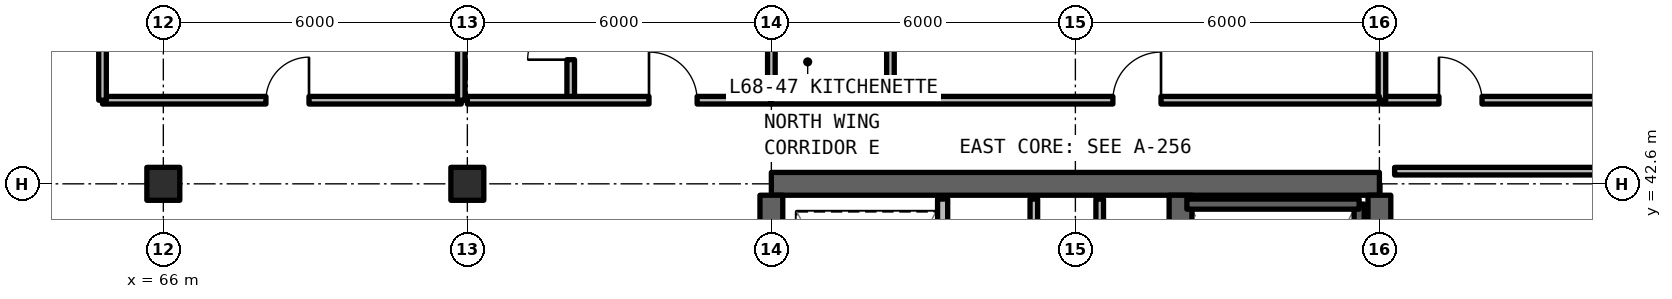
"""IFC4 building model, lengths in metres.
Left out: names, types, materials, properties, quantities, classifications, styles, units other than length and angle.
Written with IfcOpenShell. Run it as: python <this file> out.ifc"""

import sys

from ifc_helpers import new_model, si_unit, direction, frame, frame_2d, origin, origin_2d, place, context, subcontext, project, spatial, rectangle, extrude, element, fill, save


model = new_model("IFC4")
c1 = context("Model", 3, precision=1e-05, world=origin(), true_north=direction((0.0, 1.0)))
c2 = subcontext(c1, "Body", "Model", "MODEL_VIEW")
j1 = project(units=[si_unit("LENGTHUNIT", "METRE"), si_unit("PLANEANGLEUNIT", "RADIAN")], contexts=[c1])
p1 = place(None, origin())
s1 = spatial("IfcSite", under=j1, at=p1, CompositionType="ELEMENT")
p2 = place(p1, origin())
s2 = spatial("IfcBuilding", under=s1, at=p2, CompositionType="ELEMENT")
p3 = place(p2, frame((0.0, 0.0, 242.55)))
s3 = spatial("IfcBuildingStorey", under=s2, at=p3, CompositionType="ELEMENT", Elevation=242.55)
p4 = place(p3, frame((90.0, 42.6, 0.0), z_axis=(0.0, 0.0, 1.0), x_axis=(-1.0, 0.0, 0.0)))
e1 = element("IfcWall", 1, at=p4, inside=s3, PredefinedType="SHEAR", context=c2, shape_type="SweptSolid", body=[
    extrude(rectangle(XDim=12.0, YDim=0.45, at=frame_2d((6.0, 0.0))), origin(), (0.0, 0.0, 1.0), 3.63),
])
p5 = place(p3, frame((90.0, 24.825, 0.0), z_axis=(0.0, 0.0, 1.0), x_axis=(0.0, 1.0, 0.0)))
e2 = element("IfcWall", 2, at=p5, inside=s3, PredefinedType="SHEAR", context=c2, shape_type="SweptSolid", body=[
    extrude(rectangle(XDim=17.55, YDim=0.45, at=frame_2d((8.775, 0.0))), origin(), (0.0, 0.0, 1.0), 3.63),
])
p6 = place(p3, frame((78.0, 36.8, 0.0), z_axis=(0.0, 0.0, 1.0), x_axis=(0.0, 1.0, 0.0)))
e3 = element("IfcWall", 3, at=p6, inside=s3, PredefinedType="SHEAR", context=c2, shape_type="SweptSolid", body=[
    extrude(rectangle(XDim=5.575, YDim=0.45, at=frame_2d((2.788, 0.0))), origin(), (0.0, 0.0, 1.0), 3.63),
])
p7 = place(p3, frame((86.075, 24.825, 0.0), z_axis=(0.0, 0.0, 1.0), x_axis=(0.0, 1.0, 0.0)))
e4 = element("IfcWall", 4, at=p7, inside=s3, PredefinedType="SHEAR", context=c2, shape_type="SweptSolid", body=[
    extrude(rectangle(XDim=17.55, YDim=0.45, at=frame_2d((8.775, 0.0))), origin(), (0.0, 0.0, 1.0), 3.63),
])
p8 = place(p7, frame((0.425, 0.0, 0.0)))
e5 = element("IfcOpeningElement", 5, at=p8, cuts=e4, PredefinedType="OPENING", context=c2, shape_type="SweptSolid", body=[
    extrude(rectangle(XDim=1.15, YDim=2.15, at=frame_2d((0.575, 1.075))), frame((0.0, 0.235, 0.0), z_axis=(0.0, -1.0, 0.0), x_axis=(1.0, 0.0, 0.0)), (0.0, 0.0, 1.0), 0.47),
])
p9 = place(p7, frame((9.625, 0.0, 0.0)))
e6 = element("IfcOpeningElement", 6, at=p9, cuts=e4, PredefinedType="OPENING", context=c2, shape_type="SweptSolid", body=[
    extrude(rectangle(XDim=1.15, YDim=2.15, at=frame_2d((0.575, 1.075))), frame((0.0, 0.235, 0.0), z_axis=(0.0, -1.0, 0.0), x_axis=(1.0, 0.0, 0.0)), (0.0, 0.0, 1.0), 0.47),
])
for number, where, z_axis, x_axis in (
    (7, (66.0, 42.6, 0.0), (0.0, 0.0, 1.0), (1.0, 0.0, 0.0)),
    (8, (72.0, 42.6, 0.0), (0.0, 0.0, 1.0), (1.0, 0.0, 0.0)),
):
    element("IfcColumn", number, at=place(p3, frame(where, z_axis=z_axis, x_axis=x_axis)), inside=s3, PredefinedType="COLUMN", context=c2, shape_type="SweptSolid", body=[
        extrude(rectangle(XDim=0.65, YDim=0.65, at=origin_2d()), origin(), (0.0, 0.0, 1.0), 3.63),
    ])
p10 = place(p3, frame((84.48, 36.88, 0.0), z_axis=(0.0, 0.0, 1.0), x_axis=(0.0, 1.0, 0.0)))
e9 = element("IfcWall", 9, at=p10, inside=s3, PredefinedType="SOLIDWALL", context=c2, shape_type="SweptSolid", body=[
    extrude(rectangle(XDim=5.42, YDim=0.15, at=frame_2d((2.71, 0.0))), origin(), (0.0, 0.0, 1.0), 2.63),
])
p11 = place(p3, frame((83.18, 36.88, 0.0), z_axis=(0.0, 0.0, 1.0), x_axis=(0.0, 1.0, 0.0)))
e10 = element("IfcWall", 10, at=p11, inside=s3, PredefinedType="SOLIDWALL", context=c2, shape_type="SweptSolid", body=[
    extrude(rectangle(XDim=5.42, YDim=0.15, at=frame_2d((2.71, 0.0))), origin(), (0.0, 0.0, 1.0), 2.63),
])
p12 = place(p11, frame((2.1, 0.0, 0.0)))
e11 = element("IfcOpeningElement", 11, at=p12, cuts=e10, PredefinedType="OPENING", context=c2, shape_type="SweptSolid", body=[
    extrude(rectangle(XDim=0.95, YDim=2.15, at=frame_2d((0.475, 1.075))), frame((0.0, 0.085, 0.0), z_axis=(0.0, -1.0, 0.0), x_axis=(1.0, 0.0, 0.0)), (0.0, 0.0, 1.0), 0.17),
])
p13 = place(p3, frame((81.38, 36.88, 0.0), z_axis=(0.0, 0.0, 1.0), x_axis=(0.0, 1.0, 0.0)))
e12 = element("IfcWall", 12, at=p13, inside=s3, PredefinedType="SOLIDWALL", context=c2, shape_type="SweptSolid", body=[
    extrude(rectangle(XDim=5.42, YDim=0.2, at=frame_2d((2.71, 0.0))), origin(), (0.0, 0.0, 1.0), 2.63),
])
p14 = place(p13, frame((0.8, 0.0, 0.0)))
e13 = element("IfcOpeningElement", 13, at=p14, cuts=e12, PredefinedType="OPENING", context=c2, shape_type="SweptSolid", body=[
    extrude(rectangle(XDim=1.1, YDim=2.2, at=frame_2d((0.55, 1.1))), frame((0.0, 0.11, 0.0), z_axis=(0.0, -1.0, 0.0), x_axis=(1.0, 0.0, 0.0)), (0.0, 0.0, 1.0), 0.22),
])
p15 = place(p13, frame((3.3, 0.0, 0.0)))
e14 = element("IfcOpeningElement", 14, at=p15, cuts=e12, PredefinedType="OPENING", context=c2, shape_type="SweptSolid", body=[
    extrude(rectangle(XDim=1.1, YDim=2.2, at=frame_2d((0.55, 1.1))), frame((0.0, 0.11, 0.0), z_axis=(0.0, -1.0, 0.0), x_axis=(1.0, 0.0, 0.0)), (0.0, 0.0, 1.0), 0.22),
])
p16 = place(p3, frame((64.8, 44.25, 0.0), z_axis=(0.0, 0.0, 1.0), x_axis=(1.0, 0.0, 0.0)))
e15 = element("IfcWall", 15, at=p16, inside=s3, PredefinedType="SOLIDWALL", context=c2, shape_type="SweptSolid", body=[
    extrude(rectangle(XDim=7.08, YDim=0.15, at=frame_2d((3.54, 0.0))), origin(), (0.0, 0.0, 1.0), 2.63),
])
p17 = place(p16, frame((3.225, 0.0, 0.0)))
e16 = element("IfcOpeningElement", 16, at=p17, cuts=e15, PredefinedType="OPENING", context=c2, shape_type="SweptSolid", body=[
    extrude(rectangle(XDim=0.85, YDim=2.1, at=frame_2d((0.425, 1.05))), frame((0.0, 0.085, 0.0), z_axis=(0.0, -1.0, 0.0), x_axis=(1.0, 0.0, 0.0)), (0.0, 0.0, 1.0), 0.17),
])
p18 = place(p3, frame((64.8, 44.25, 0.0), z_axis=(0.0, 0.0, 1.0), x_axis=(0.0, 1.0, 0.0)))
e17 = element("IfcWall", 17, at=p18, inside=s3, PredefinedType="SOLIDWALL", context=c2, shape_type="SweptSolid", body=[
    extrude(rectangle(XDim=3.4, YDim=0.15, at=frame_2d((1.7, 0.0))), origin(), (0.0, 0.0, 1.0), 2.63),
])
p19 = place(p3, frame((71.88, 44.25, 0.0), z_axis=(0.0, 0.0, 1.0), x_axis=(0.0, 1.0, 0.0)))
e18 = element("IfcWall", 18, at=p19, inside=s3, PredefinedType="SOLIDWALL", context=c2, shape_type="SweptSolid", body=[
    extrude(rectangle(XDim=10.61, YDim=0.15, at=frame_2d((5.305, 0.0))), origin(), (0.0, 0.0, 1.0), 2.63),
])
p20 = place(p3, frame((90.3, 42.85, 0.0), z_axis=(0.0, 0.0, 1.0), x_axis=(1.0, 0.0, 0.0)))
e19 = element("IfcWall", 19, at=p20, inside=s3, PredefinedType="SOLIDWALL", context=c2, shape_type="SweptSolid", body=[
    extrude(rectangle(XDim=8.52, YDim=0.15, at=frame_2d((4.26, 0.0))), origin(), (0.0, 0.0, 1.0), 2.63),
])
p21 = place(p3, frame((90.05, 44.25, 0.0), z_axis=(0.0, 0.0, 1.0), x_axis=(1.0, 0.0, 0.0)))
e20 = element("IfcWall", 20, at=p21, inside=s3, PredefinedType="SOLIDWALL", context=c2, shape_type="SweptSolid", body=[
    extrude(rectangle(XDim=5.37, YDim=0.15, at=frame_2d((2.685, 0.0))), origin(), (0.0, 0.0, 1.0), 2.63),
])
p22 = place(p21, frame((1.125, 0.0, 0.0)))
e21 = element("IfcOpeningElement", 21, at=p22, cuts=e20, PredefinedType="OPENING", context=c2, shape_type="SweptSolid", body=[
    extrude(rectangle(XDim=0.85, YDim=2.1, at=frame_2d((0.425, 1.05))), frame((0.0, 0.085, 0.0), z_axis=(0.0, -1.0, 0.0), x_axis=(1.0, 0.0, 0.0)), (0.0, 0.0, 1.0), 0.17),
])
for number, where, z_axis, x_axis in (
    (22, (90.05, 44.25, 0.0), (0.0, 0.0, 1.0), (0.0, 1.0, 0.0)),
    (23, (78.0, 44.25, 0.0), (0.0, 0.0, 1.0), (0.0, 1.0, 0.0)),
):
    element("IfcWall", number, at=place(p3, frame(where, z_axis=z_axis, x_axis=x_axis)), inside=s3, PredefinedType="SOLIDWALL", context=c2, shape_type="SweptSolid", body=[
        extrude(rectangle(XDim=10.61, YDim=0.15, at=frame_2d((5.305, 0.0))), origin(), (0.0, 0.0, 1.0), 2.63),
    ])
p23 = place(p3, frame((74.04, 44.25, 0.0), z_axis=(0.0, 0.0, 1.0), x_axis=(0.0, 1.0, 0.0)))
e24 = element("IfcWall", 24, at=p23, inside=s3, PredefinedType="PARTITIONING", context=c2, shape_type="SweptSolid", body=[
    extrude(rectangle(XDim=10.61, YDim=0.15, at=frame_2d((5.305, 0.0))), origin(), (0.0, 0.0, 1.0), 2.63),
])
p24 = place(p23, frame((0.8, 0.0, 0.0)))
e25 = element("IfcOpeningElement", 25, at=p24, cuts=e24, PredefinedType="OPENING", context=c2, shape_type="SweptSolid", body=[
    extrude(rectangle(XDim=0.85, YDim=2.1, at=frame_2d((0.425, 1.05))), frame((0.0, 0.085, 0.0), z_axis=(0.0, -1.0, 0.0), x_axis=(1.0, 0.0, 0.0)), (0.0, 0.0, 1.0), 0.17),
])
p25 = place(p23, frame((5.374, 0.0, 0.0)))
e26 = element("IfcOpeningElement", 26, at=p25, cuts=e24, PredefinedType="OPENING", context=c2, shape_type="SweptSolid", body=[
    extrude(rectangle(XDim=0.85, YDim=2.1, at=frame_2d((0.425, 1.05))), frame((0.0, 0.085, 0.0), z_axis=(0.0, -1.0, 0.0), x_axis=(1.0, 0.0, 0.0)), (0.0, 0.0, 1.0), 0.17),
])
p26 = place(p3, frame((72.0, 44.25, 0.0), z_axis=(0.0, 0.0, 1.0), x_axis=(1.0, 0.0, 0.0)))
e27 = element("IfcWall", 27, at=p26, inside=s3, PredefinedType="SOLIDWALL", context=c2, shape_type="SweptSolid", body=[
    extrude(rectangle(XDim=6.0, YDim=0.15, at=frame_2d((3.0, 0.0))), origin(), (0.0, 0.0, 1.0), 2.63),
])
p27 = place(p26, frame((3.585, 0.0, 0.0)))
e28 = element("IfcOpeningElement", 28, at=p27, cuts=e27, PredefinedType="OPENING", context=c2, shape_type="SweptSolid", body=[
    extrude(rectangle(XDim=0.95, YDim=2.15, at=frame_2d((0.475, 1.075))), frame((0.0, 0.085, 0.0), z_axis=(0.0, -1.0, 0.0), x_axis=(1.0, 0.0, 0.0)), (0.0, 0.0, 1.0), 0.17),
])
p28 = place(p3, frame((80.35, 44.25, 0.0), z_axis=(0.0, 0.0, 1.0), x_axis=(0.0, 1.0, 0.0)))
e29 = element("IfcWall", 29, at=p28, inside=s3, PredefinedType="PARTITIONING", context=c2, shape_type="SweptSolid", body=[
    extrude(rectangle(XDim=5.882, YDim=0.15, at=frame_2d((2.941, 0.0))), origin(), (0.0, 0.0, 1.0), 2.63),
])
p29 = place(p28, frame((1.31, 0.0, 0.0)))
e30 = element("IfcOpeningElement", 30, at=p29, cuts=e29, PredefinedType="OPENING", context=c2, shape_type="SweptSolid", body=[
    extrude(rectangle(XDim=0.85, YDim=2.1, at=frame_2d((0.425, 1.05))), frame((0.0, 0.085, 0.0), z_axis=(0.0, -1.0, 0.0), x_axis=(1.0, 0.0, 0.0)), (0.0, 0.0, 1.0), 0.17),
])
p30 = place(p28, frame((4.251, 0.0, 0.0)))
e31 = element("IfcOpeningElement", 31, at=p30, cuts=e29, PredefinedType="OPENING", context=c2, shape_type="SweptSolid", body=[
    extrude(rectangle(XDim=0.85, YDim=2.1, at=frame_2d((0.425, 1.05))), frame((0.0, 0.085, 0.0), z_axis=(0.0, -1.0, 0.0), x_axis=(1.0, 0.0, 0.0)), (0.0, 0.0, 1.0), 0.17),
])
p31 = place(p3, frame((78.0, 44.25, 0.0), z_axis=(0.0, 0.0, 1.0), x_axis=(1.0, 0.0, 0.0)))
e32 = element("IfcWall", 32, at=p31, inside=s3, PredefinedType="SOLIDWALL", context=c2, shape_type="SweptSolid", body=[
    extrude(rectangle(XDim=12.0, YDim=0.15, at=frame_2d((6.0, 0.0))), origin(), (0.0, 0.0, 1.0), 2.63),
])
p32 = place(p31, frame((6.74, 0.0, 0.0)))
e33 = element("IfcOpeningElement", 33, at=p32, cuts=e32, PredefinedType="OPENING", context=c2, shape_type="SweptSolid", body=[
    extrude(rectangle(XDim=0.95, YDim=2.15, at=frame_2d((0.475, 1.075))), frame((0.0, 0.085, 0.0), z_axis=(0.0, -1.0, 0.0), x_axis=(1.0, 0.0, 0.0)), (0.0, 0.0, 1.0), 0.17),
])
p33 = place(p3, frame((89.6, 34.2, 0.0), z_axis=(0.0, 0.0, 1.0), x_axis=(0.0, 1.0, 0.0)))
e34 = element("IfcWall", 34, at=p33, inside=s3, PredefinedType="SOLIDWALL", context=c2, shape_type="SweptSolid", body=[
    extrude(rectangle(XDim=8.0, YDim=0.2, at=frame_2d((4.0, 0.0))), origin(), (0.0, 0.0, 1.0), 3.63),
])
p34 = place(p3, frame((89.6, 42.2, 0.0), z_axis=(0.0, 0.0, 1.0), x_axis=(-1.0, 0.0, 0.0)))
e35 = element("IfcWall", 35, at=p34, inside=s3, PredefinedType="SOLIDWALL", context=c2, shape_type="SweptSolid", body=[
    extrude(rectangle(XDim=3.4, YDim=0.2, at=frame_2d((1.7, 0.0))), origin(), (0.0, 0.0, 1.0), 3.63),
])
p35 = place(p17, origin())
e36 = element("IfcDoor", 36, at=p35, inside=s3, OperationType="SINGLE_SWING_RIGHT", PredefinedType="DOOR", context=c2, shape_type="SweptSolid", body=[
    extrude(rectangle(XDim=0.85, YDim=2.1, at=frame_2d((0.425, 1.05))), frame((0.0, 0.025, 0.0), z_axis=(0.0, -1.0, 0.0), x_axis=(1.0, 0.0, 0.0)), (0.0, 0.0, 1.0), 0.05),
])
fill(e16, e36)
p36 = place(p22, origin())
e37 = element("IfcDoor", 37, at=p36, inside=s3, OperationType="SINGLE_SWING_LEFT", PredefinedType="DOOR", context=c2, shape_type="SweptSolid", body=[
    extrude(rectangle(XDim=0.85, YDim=2.1, at=frame_2d((0.425, 1.05))), frame((0.0, 0.025, 0.0), z_axis=(0.0, -1.0, 0.0), x_axis=(1.0, 0.0, 0.0)), (0.0, 0.0, 1.0), 0.05),
])
fill(e21, e37)
p37 = place(p24, origin())
e38 = element("IfcDoor", 38, at=p37, inside=s3, OperationType="SINGLE_SWING_LEFT", PredefinedType="DOOR", context=c2, shape_type="SweptSolid", body=[
    extrude(rectangle(XDim=0.85, YDim=2.1, at=frame_2d((0.425, 1.05))), frame((0.0, 0.025, 0.0), z_axis=(0.0, -1.0, 0.0), x_axis=(1.0, 0.0, 0.0)), (0.0, 0.0, 1.0), 0.05),
])
fill(e25, e38)
p38 = place(p27, origin())
e39 = element("IfcDoor", 39, at=p38, inside=s3, OperationType="SINGLE_SWING_LEFT", PredefinedType="DOOR", context=c2, shape_type="SweptSolid", body=[
    extrude(rectangle(XDim=0.95, YDim=2.15, at=frame_2d((0.475, 1.075))), frame((0.0, 0.025, 0.0), z_axis=(0.0, -1.0, 0.0), x_axis=(1.0, 0.0, 0.0)), (0.0, 0.0, 1.0), 0.05),
])
fill(e28, e39)
p39 = place(p32, origin())
e40 = element("IfcDoor", 40, at=p39, inside=s3, OperationType="SINGLE_SWING_RIGHT", PredefinedType="DOOR", context=c2, shape_type="SweptSolid", body=[
    extrude(rectangle(XDim=0.95, YDim=2.15, at=frame_2d((0.475, 1.075))), frame((0.0, 0.025, 0.0), z_axis=(0.0, -1.0, 0.0), x_axis=(1.0, 0.0, 0.0)), (0.0, 0.0, 1.0), 0.05),
])
fill(e33, e40)
save(model, sys.argv[1])
